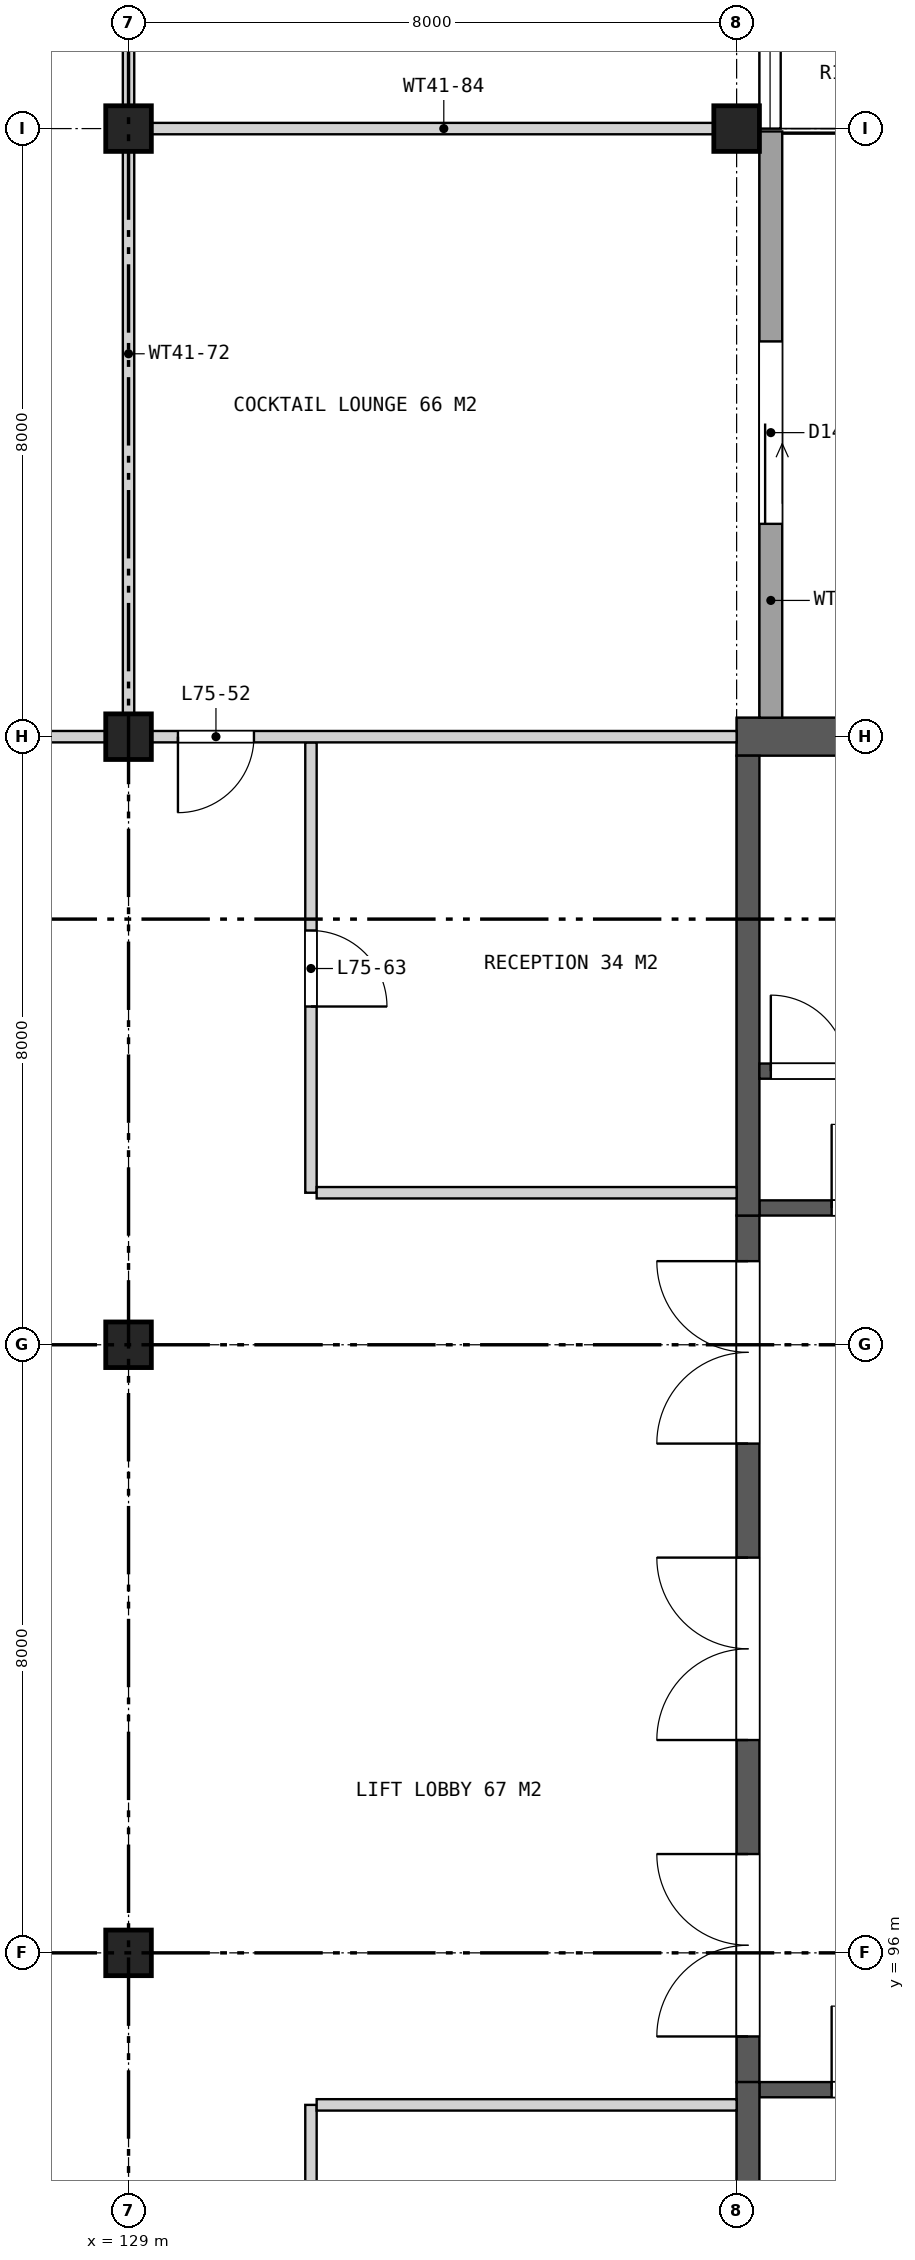
"""IFC4 building model, lengths in metres.
Left out: names, types, materials, properties, quantities, classifications, styles, units other than length and angle.
Written with IfcOpenShell. Run it as: python <this file> out.ifc"""

import sys

from ifc_helpers import new_model, si_unit, direction, frame, frame_2d, origin, origin_2d, place, context, subcontext, project, spatial, rectangle, extrude, element, fill, save


model = new_model("IFC4")
c1 = context("Model", 3, precision=1e-05, world=origin(), true_north=direction((0.0, 1.0)))
c2 = subcontext(c1, "Body", "Model", "MODEL_VIEW")
j1 = project(units=[si_unit("LENGTHUNIT", "METRE"), si_unit("PLANEANGLEUNIT", "RADIAN")], contexts=[c1])
p1 = place(None, origin())
s1 = spatial("IfcSite", under=j1, at=p1, CompositionType="ELEMENT")
p2 = place(p1, origin())
s2 = spatial("IfcBuilding", under=s1, at=p2, CompositionType="ELEMENT")
p3 = place(p2, frame((0.0, 0.0, 344.9)))
s3 = spatial("IfcBuildingStorey", under=s2, at=p3, CompositionType="ELEMENT", Elevation=344.9)
for number, where, z_axis, x_axis in (
    (1, (129.0, 96.0, 0.0), (0.0, 0.0, 1.0), (1.0, 0.0, 0.0)),
    (2, (129.0, 104.0, 0.0), (0.0, 0.0, 1.0), (1.0, 0.0, 0.0)),
    (3, (129.0, 112.0, 0.0), (0.0, 0.0, 1.0), (1.0, 0.0, 0.0)),
    (4, (129.0, 120.0, 0.0), (0.0, 0.0, 1.0), (1.0, 0.0, 0.0)),
    (5, (137.0, 120.0, 0.0), (0.0, 0.0, 1.0), (1.0, 0.0, 0.0)),
):
    element("IfcColumn", number, at=place(p3, frame(where, z_axis=z_axis, x_axis=x_axis)), inside=s3, PredefinedType="COLUMN", context=c2, shape_type="SweptSolid", body=[
        extrude(rectangle(XDim=0.6, YDim=0.6, at=origin_2d()), origin(), (0.0, 0.0, 1.0), 4.2),
    ])
p4 = place(p3, frame((137.0, 112.0, 0.0), z_axis=(0.0, 0.0, 1.0), x_axis=(1.0, 0.0, 0.0)))
e6 = element("IfcWall", 6, at=p4, inside=s3, PredefinedType="SHEAR", context=c2, shape_type="SweptSolid", body=[
    extrude(rectangle(XDim=7.1, YDim=0.5, at=frame_2d((3.55, 0.0))), origin(), (0.0, 0.0, 1.0), 4.2),
])
p5 = place(p3, frame((137.15, 94.3, 0.0), z_axis=(0.0, 0.0, 1.0), x_axis=(0.0, 1.0, 0.0)))
e7 = element("IfcWall", 7, at=p5, inside=s3, PredefinedType="SHEAR", context=c2, shape_type="SweptSolid", body=[
    extrude(rectangle(XDim=11.4, YDim=0.3, at=frame_2d((5.7, 0.0))), origin(), (0.0, 0.0, 1.0), 4.2),
])
p6 = place(p5, frame((0.6, 0.0, 0.0)))
e8 = element("IfcOpeningElement", 8, at=p6, cuts=e7, PredefinedType="OPENING", context=c2, shape_type="SweptSolid", body=[
    extrude(rectangle(XDim=2.4, YDim=2.4, at=frame_2d((1.2, 1.2))), frame((0.0, 0.16, 0.0), z_axis=(0.0, -1.0, 0.0), x_axis=(1.0, 0.0, 0.0)), (0.0, 0.0, 1.0), 0.32),
])
p7 = place(p5, frame((4.5, 0.0, 0.0)))
e9 = element("IfcOpeningElement", 9, at=p7, cuts=e7, PredefinedType="OPENING", context=c2, shape_type="SweptSolid", body=[
    extrude(rectangle(XDim=2.4, YDim=2.4, at=frame_2d((1.2, 1.2))), frame((0.0, 0.16, 0.0), z_axis=(0.0, -1.0, 0.0), x_axis=(1.0, 0.0, 0.0)), (0.0, 0.0, 1.0), 0.32),
])
p8 = place(p5, frame((8.4, 0.0, 0.0)))
e10 = element("IfcOpeningElement", 10, at=p8, cuts=e7, PredefinedType="OPENING", context=c2, shape_type="SweptSolid", body=[
    extrude(rectangle(XDim=2.4, YDim=2.4, at=frame_2d((1.2, 1.2))), frame((0.0, 0.16, 0.0), z_axis=(0.0, -1.0, 0.0), x_axis=(1.0, 0.0, 0.0)), (0.0, 0.0, 1.0), 0.32),
])
p9 = place(p3, frame((137.3, 105.8, 0.0), z_axis=(0.0, 0.0, 1.0), x_axis=(1.0, 0.0, 0.0)))
e11 = element("IfcWall", 11, at=p9, inside=s3, PredefinedType="SHEAR", context=c2, shape_type="SweptSolid", body=[
    extrude(rectangle(XDim=15.45, YDim=0.2, at=frame_2d((7.725, 0.0))), origin(), (0.0, 0.0, 1.0), 4.2),
])
p10 = place(p9, frame((0.95, 0.0, 0.0)))
e12 = element("IfcOpeningElement", 12, at=p10, cuts=e11, PredefinedType="OPENING", context=c2, shape_type="SweptSolid", body=[
    extrude(rectangle(XDim=1.1, YDim=2.1, at=frame_2d((0.55, 1.05))), frame((0.0, 0.11, 0.0), z_axis=(0.0, -1.0, 0.0), x_axis=(1.0, 0.0, 0.0)), (0.0, 0.0, 1.0), 0.22),
])
p11 = place(p3, frame((137.15, 105.7, 0.0), z_axis=(0.0, 0.0, 1.0), x_axis=(0.0, 1.0, 0.0)))
e13 = element("IfcWall", 13, at=p11, inside=s3, PredefinedType="SHEAR", context=c2, shape_type="SweptSolid", body=[
    extrude(rectangle(XDim=6.05, YDim=0.3, at=frame_2d((3.025, 0.0))), origin(), (0.0, 0.0, 1.0), 4.2),
])
p12 = place(p3, frame((137.3, 107.6, 0.0), z_axis=(0.0, 0.0, 1.0), x_axis=(1.0, 0.0, 0.0)))
e14 = element("IfcWall", 14, at=p12, inside=s3, PredefinedType="SHEAR", context=c2, shape_type="SweptSolid", body=[
    extrude(rectangle(XDim=6.8, YDim=0.2, at=frame_2d((3.4, 0.0))), origin(), (0.0, 0.0, 1.0), 4.2),
])
p13 = place(p12, frame((0.15, 0.0, 0.0)))
e15 = element("IfcOpeningElement", 15, at=p13, cuts=e14, PredefinedType="OPENING", context=c2, shape_type="SweptSolid", body=[
    extrude(rectangle(XDim=1.0, YDim=2.1, at=frame_2d((0.5, 1.05))), frame((0.0, 0.11, 0.0), z_axis=(0.0, -1.0, 0.0), x_axis=(1.0, 0.0, 0.0)), (0.0, 0.0, 1.0), 0.22),
])
p14 = place(p3, frame((137.3, 94.2, 0.0), z_axis=(0.0, 0.0, 1.0), x_axis=(1.0, 0.0, 0.0)))
e16 = element("IfcWall", 16, at=p14, inside=s3, PredefinedType="SHEAR", context=c2, shape_type="SweptSolid", body=[
    extrude(rectangle(XDim=15.45, YDim=0.2, at=frame_2d((7.725, 0.0))), origin(), (0.0, 0.0, 1.0), 4.2),
])
p15 = place(p14, frame((0.95, 0.0, 0.0)))
e17 = element("IfcOpeningElement", 17, at=p15, cuts=e16, PredefinedType="OPENING", context=c2, shape_type="SweptSolid", body=[
    extrude(rectangle(XDim=1.1, YDim=2.1, at=frame_2d((0.55, 1.05))), frame((0.0, 0.11, 0.0), z_axis=(0.0, -1.0, 0.0), x_axis=(1.0, 0.0, 0.0)), (0.0, 0.0, 1.0), 0.22),
])
p16 = place(p3, frame((137.15, 88.25, 0.0), z_axis=(0.0, 0.0, 1.0), x_axis=(0.0, 1.0, 0.0)))
e18 = element("IfcWall", 18, at=p16, inside=s3, PredefinedType="SHEAR", context=c2, shape_type="SweptSolid", body=[
    extrude(rectangle(XDim=6.05, YDim=0.3, at=frame_2d((3.025, 0.0))), origin(), (0.0, 0.0, 1.0), 4.2),
])
p17 = place(p3, frame((137.45, 112.25, 0.0), z_axis=(0.0, 0.0, 1.0), x_axis=(0.0, 1.0, 0.0)))
e19 = element("IfcWall", 19, at=p17, inside=s3, PredefinedType="SOLIDWALL", context=c2, shape_type="SweptSolid", body=[
    extrude(rectangle(XDim=7.712, YDim=0.3, at=frame_2d((3.856, 0.0))), origin(), (0.0, 0.0, 1.0), 3.85),
])
p18 = place(p17, frame((2.55, 0.0, 0.0)))
e20 = element("IfcOpeningElement", 20, at=p18, cuts=e19, PredefinedType="OPENING", context=c2, shape_type="SweptSolid", body=[
    extrude(rectangle(XDim=2.4, YDim=2.4, at=frame_2d((1.2, 1.2))), frame((0.0, 0.16, 0.0), z_axis=(0.0, -1.0, 0.0), x_axis=(1.0, 0.0, 0.0)), (0.0, 0.0, 1.0), 0.32),
])
p19 = place(p3, frame((129.0, 112.075, 0.0), z_axis=(0.0, 0.0, 1.0), x_axis=(0.0, 1.0, 0.0)))
e21 = element("IfcWall", 21, at=p19, inside=s3, PredefinedType="PARTITIONING", context=c2, shape_type="SweptSolid", body=[
    extrude(rectangle(XDim=9.925, YDim=0.15, at=frame_2d((4.962, 0.0))), origin(), (0.0, 0.0, 1.0), 3.396),
])
p20 = place(p3, frame((131.4, 88.075, 0.0), z_axis=(0.0, 0.0, 1.0), x_axis=(0.0, 1.0, 0.0)))
e22 = element("IfcWall", 22, at=p20, inside=s3, PredefinedType="PARTITIONING", context=c2, shape_type="SweptSolid", body=[
    extrude(rectangle(XDim=5.925, YDim=0.15, at=frame_2d((2.962, 0.0))), origin(), (0.0, 0.0, 1.0), 3.396),
])
p21 = place(p20, frame((2.45, 0.0, 0.0)))
e23 = element("IfcOpeningElement", 23, at=p21, cuts=e22, PredefinedType="OPENING", context=c2, shape_type="SweptSolid", body=[
    extrude(rectangle(XDim=1.0, YDim=2.1, at=frame_2d((0.5, 1.05))), frame((0.0, 0.085, 0.0), z_axis=(0.0, -1.0, 0.0), x_axis=(1.0, 0.0, 0.0)), (0.0, 0.0, 1.0), 0.17),
])
p22 = place(p3, frame((131.4, 106.0, 0.0), z_axis=(0.0, 0.0, 1.0), x_axis=(0.0, 1.0, 0.0)))
e24 = element("IfcWall", 24, at=p22, inside=s3, PredefinedType="PARTITIONING", context=c2, shape_type="SweptSolid", body=[
    extrude(rectangle(XDim=5.925, YDim=0.15, at=frame_2d((2.962, 0.0))), origin(), (0.0, 0.0, 1.0), 3.396),
])
p23 = place(p22, frame((2.45, 0.0, 0.0)))
e25 = element("IfcOpeningElement", 25, at=p23, cuts=e24, PredefinedType="OPENING", context=c2, shape_type="SweptSolid", body=[
    extrude(rectangle(XDim=1.0, YDim=2.1, at=frame_2d((0.5, 1.05))), frame((0.0, 0.085, 0.0), z_axis=(0.0, -1.0, 0.0), x_axis=(1.0, 0.0, 0.0)), (0.0, 0.0, 1.0), 0.17),
])
for number, where, z_axis, x_axis in (
    (26, (131.475, 94.0, 0.0), (0.0, 0.0, 1.0), (1.0, 0.0, 0.0)),
    (27, (131.475, 106.0, 0.0), (0.0, 0.0, 1.0), (1.0, 0.0, 0.0)),
):
    element("IfcWall", number, at=place(p3, frame(where, z_axis=z_axis, x_axis=x_axis)), inside=s3, PredefinedType="PARTITIONING", context=c2, shape_type="SweptSolid", body=[
        extrude(rectangle(XDim=5.525, YDim=0.15, at=frame_2d((2.762, 0.0))), origin(), (0.0, 0.0, 1.0), 3.396),
    ])
p24 = place(p3, frame((113.0, 112.0, 0.0), z_axis=(0.0, 0.0, 1.0), x_axis=(1.0, 0.0, 0.0)))
e28 = element("IfcWall", 28, at=p24, inside=s3, PredefinedType="PARTITIONING", context=c2, shape_type="SweptSolid", body=[
    extrude(rectangle(XDim=24.0, YDim=0.15, at=frame_2d((12.0, 0.0))), origin(), (0.0, 0.0, 1.0), 3.396),
])
p25 = place(p24, frame((9.95, 0.0, 0.0)))
e29 = element("IfcOpeningElement", 29, at=p25, cuts=e28, PredefinedType="OPENING", context=c2, shape_type="SweptSolid", body=[
    extrude(rectangle(XDim=1.8, YDim=2.1, at=frame_2d((0.9, 1.05))), frame((0.0, 0.085, 0.0), z_axis=(0.0, -1.0, 0.0), x_axis=(1.0, 0.0, 0.0)), (0.0, 0.0, 1.0), 0.17),
])
p26 = place(p24, frame((16.65, 0.0, 0.0)))
e30 = element("IfcOpeningElement", 30, at=p26, cuts=e28, PredefinedType="OPENING", context=c2, shape_type="SweptSolid", body=[
    extrude(rectangle(XDim=1.0, YDim=2.1, at=frame_2d((0.5, 1.05))), frame((0.0, 0.085, 0.0), z_axis=(0.0, -1.0, 0.0), x_axis=(1.0, 0.0, 0.0)), (0.0, 0.0, 1.0), 0.17),
])
p27 = place(p3, frame((129.075, 120.0, 0.0), z_axis=(0.0, 0.0, 1.0), x_axis=(1.0, 0.0, 0.0)))
e31 = element("IfcWall", 31, at=p27, inside=s3, PredefinedType="PARTITIONING", context=c2, shape_type="SweptSolid", body=[
    extrude(rectangle(XDim=8.145, YDim=0.15, at=frame_2d((4.073, 0.0))), origin(), (0.0, 0.0, 1.0), 3.396),
])
p28 = place(p6, origin())
e32 = element("IfcDoor", 32, at=p28, inside=s3, OperationType="DOUBLE_DOOR_SINGLE_SWING", PredefinedType="DOOR", context=c2, shape_type="SweptSolid", body=[
    extrude(rectangle(XDim=2.4, YDim=2.4, at=frame_2d((1.2, 1.2))), frame((0.0, 0.025, 0.0), z_axis=(0.0, -1.0, 0.0), x_axis=(1.0, 0.0, 0.0)), (0.0, 0.0, 1.0), 0.05),
])
fill(e8, e32)
p29 = place(p7, origin())
e33 = element("IfcDoor", 33, at=p29, inside=s3, OperationType="DOUBLE_DOOR_SINGLE_SWING", PredefinedType="DOOR", context=c2, shape_type="SweptSolid", body=[
    extrude(rectangle(XDim=2.4, YDim=2.4, at=frame_2d((1.2, 1.2))), frame((0.0, 0.025, 0.0), z_axis=(0.0, -1.0, 0.0), x_axis=(1.0, 0.0, 0.0)), (0.0, 0.0, 1.0), 0.05),
])
fill(e9, e33)
p30 = place(p8, origin())
e34 = element("IfcDoor", 34, at=p30, inside=s3, OperationType="DOUBLE_DOOR_SINGLE_SWING", PredefinedType="DOOR", context=c2, shape_type="SweptSolid", body=[
    extrude(rectangle(XDim=2.4, YDim=2.4, at=frame_2d((1.2, 1.2))), frame((0.0, 0.025, 0.0), z_axis=(0.0, -1.0, 0.0), x_axis=(1.0, 0.0, 0.0)), (0.0, 0.0, 1.0), 0.05),
])
fill(e10, e34)
p31 = place(p10, origin())
e35 = element("IfcDoor", 35, at=p31, inside=s3, OperationType="SINGLE_SWING_LEFT", PredefinedType="DOOR", context=c2, shape_type="SweptSolid", body=[
    extrude(rectangle(XDim=1.1, YDim=2.1, at=frame_2d((0.55, 1.05))), frame((0.0, 0.025, 0.0), z_axis=(0.0, -1.0, 0.0), x_axis=(1.0, 0.0, 0.0)), (0.0, 0.0, 1.0), 0.05),
])
fill(e12, e35)
p32 = place(p13, origin())
e36 = element("IfcDoor", 36, at=p32, inside=s3, OperationType="SINGLE_SWING_LEFT", PredefinedType="DOOR", context=c2, shape_type="SweptSolid", body=[
    extrude(rectangle(XDim=1.0, YDim=2.1, at=frame_2d((0.5, 1.05))), frame((0.0, 0.025, 0.0), z_axis=(0.0, -1.0, 0.0), x_axis=(1.0, 0.0, 0.0)), (0.0, 0.0, 1.0), 0.05),
])
fill(e15, e36)
p33 = place(p15, origin())
e37 = element("IfcDoor", 37, at=p33, inside=s3, OperationType="SINGLE_SWING_LEFT", PredefinedType="DOOR", context=c2, shape_type="SweptSolid", body=[
    extrude(rectangle(XDim=1.1, YDim=2.1, at=frame_2d((0.55, 1.05))), frame((0.0, 0.025, 0.0), z_axis=(0.0, -1.0, 0.0), x_axis=(1.0, 0.0, 0.0)), (0.0, 0.0, 1.0), 0.05),
])
fill(e17, e37)
p34 = place(p18, frame((2.4, 0.0, 0.0), z_axis=(0.0, 0.0, 1.0), x_axis=(-1.0, 0.0, 0.0)))
e38 = element("IfcDoor", 38, at=p34, inside=s3, OperationType="SLIDING_TO_LEFT", PredefinedType="DOOR", context=c2, shape_type="SweptSolid", body=[
    extrude(rectangle(XDim=2.4, YDim=2.4, at=frame_2d((1.2, 1.2))), frame((0.0, 0.025, 0.0), z_axis=(0.0, -1.0, 0.0), x_axis=(1.0, 0.0, 0.0)), (0.0, 0.0, 1.0), 0.05),
])
fill(e20, e38)
p35 = place(p26, frame((1.0, 0.0, 0.0), z_axis=(0.0, 0.0, 1.0), x_axis=(-1.0, 0.0, 0.0)))
e39 = element("IfcDoor", 39, at=p35, inside=s3, OperationType="SINGLE_SWING_RIGHT", PredefinedType="DOOR", context=c2, shape_type="SweptSolid", body=[
    extrude(rectangle(XDim=1.0, YDim=2.1, at=frame_2d((0.5, 1.05))), frame((0.0, 0.025, 0.0), z_axis=(0.0, -1.0, 0.0), x_axis=(1.0, 0.0, 0.0)), (0.0, 0.0, 1.0), 0.05),
])
fill(e30, e39)
p36 = place(p23, frame((1.0, 0.0, 0.0), z_axis=(0.0, 0.0, 1.0), x_axis=(-1.0, 0.0, 0.0)))
e40 = element("IfcDoor", 40, at=p36, inside=s3, OperationType="SINGLE_SWING_RIGHT", PredefinedType="DOOR", context=c2, shape_type="SweptSolid", body=[
    extrude(rectangle(XDim=1.0, YDim=2.1, at=frame_2d((0.5, 1.05))), frame((0.0, 0.025, 0.0), z_axis=(0.0, -1.0, 0.0), x_axis=(1.0, 0.0, 0.0)), (0.0, 0.0, 1.0), 0.05),
])
fill(e25, e40)
save(model, sys.argv[1])
